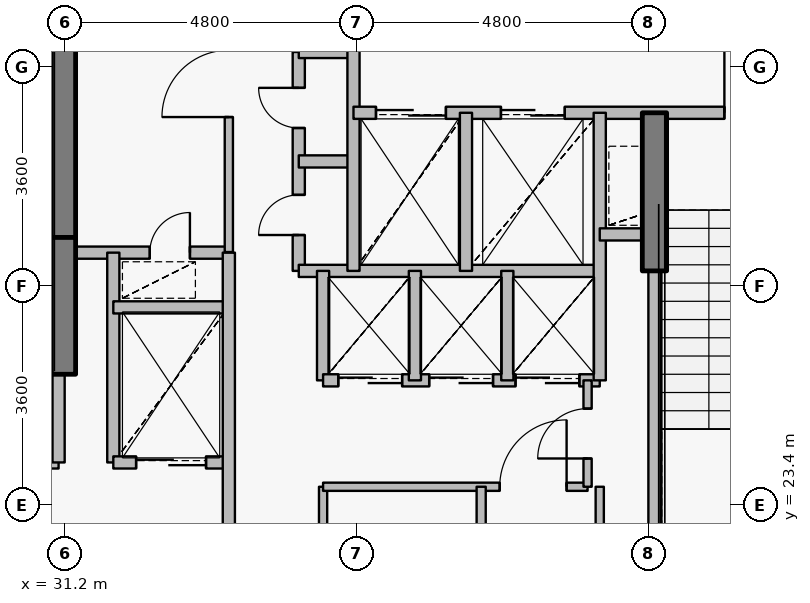
"""IFC4 building model, lengths in metres.
Left out: names, types, materials, properties, quantities, classifications, styles, units other than length and angle.
Written with IfcOpenShell. Run it as: python <this file> out.ifc"""

import sys

from ifc_helpers import new_model, si_unit, direction, frame, frame_2d, origin, origin_2d, place, context, subcontext, project, spatial, rectangle, extrude, source, transform, mapped, element, fill, save


model = new_model("IFC4")
c1 = context("Model", 3, precision=1e-05, world=origin(), true_north=direction((0.0, 1.0)))
c2 = subcontext(c1, "Body", "Model", "MODEL_VIEW")
j1 = project(units=[si_unit("LENGTHUNIT", "METRE"), si_unit("PLANEANGLEUNIT", "RADIAN")], contexts=[c1])
p1 = place(None, origin())
s1 = spatial("IfcSite", under=j1, at=p1, CompositionType="ELEMENT")
p2 = place(p1, origin())
s2 = spatial("IfcBuilding", under=s1, at=p2, CompositionType="ELEMENT")
p3 = place(p2, frame((0.0, 0.0, 331.6)))
s3 = spatial("IfcBuildingStorey", under=s2, at=p3, CompositionType="ELEMENT", Elevation=331.6)
p4 = place(p3, frame((31.18, 27.8, 0.0), z_axis=(0.0, 0.0, 1.0), x_axis=(0.0, 1.0, 0.0)))
e1 = element("IfcWall", 1, at=p4, inside=s3, PredefinedType="SHEAR", context=c2, shape_type="SweptSolid", body=[
    extrude(rectangle(XDim=4.75, YDim=0.4, at=frame_2d((2.375, 0.0))), origin(), (0.0, 0.0, 1.0), 3.8),
])
p5 = place(p3, frame((31.18, 25.55, 0.0), z_axis=(0.0, 0.0, 1.0), x_axis=(0.0, 1.0, 0.0)))
e2 = element("IfcWall", 2, at=p5, inside=s3, PredefinedType="SHEAR", context=c2, shape_type="SweptSolid", body=[
    extrude(rectangle(XDim=2.25, YDim=0.4, at=frame_2d((1.125, 0.0))), origin(), (0.0, 0.0, 1.0), 3.15),
])
p6 = place(p3, frame((40.9, 27.25, 0.0), z_axis=(0.0, 0.0, 1.0), x_axis=(0.0, 1.0, 0.0)))
e3 = element("IfcWall", 3, at=p6, inside=s3, PredefinedType="SHEAR", context=c2, shape_type="SweptSolid", body=[
    extrude(rectangle(XDim=2.6, YDim=0.4, at=frame_2d((1.3, 0.0))), origin(), (0.0, 0.0, 1.0), 3.15),
])
p7 = place(p3, frame((27.56, 24.1, 0.0), z_axis=(0.0, 0.0, 1.0), x_axis=(1.0, 0.0, 0.0)))
e4 = element("IfcWall", 4, at=p7, inside=s3, PredefinedType="PARTITIONING", context=c2, shape_type="SweptSolid", body=[
    extrude(rectangle(XDim=3.54, YDim=0.2, at=frame_2d((1.77, 0.0))), origin(), (0.0, 0.0, 1.0), 3.55),
])
p8 = place(p7, frame((1.17, 0.0, 0.0)))
e5 = element("IfcOpeningElement", 5, at=p8, cuts=e4, PredefinedType="OPENING", context=c2, shape_type="SweptSolid", body=[
    extrude(rectangle(XDim=1.2, YDim=2.15, at=origin_2d()), frame((0.6, 0.11, 1.075), z_axis=(0.0, -1.0, 0.0), x_axis=(1.0, 0.0, 0.0)), (0.0, 0.0, 1.0), 0.22),
])
p9 = place(p3, frame((31.1, 24.1, 0.0), z_axis=(0.0, 0.0, 1.0), x_axis=(0.0, 1.0, 0.0)))
e6 = element("IfcWall", 6, at=p9, inside=s3, PredefinedType="PARTITIONING", context=c2, shape_type="SweptSolid", body=[
    extrude(rectangle(XDim=1.44, YDim=0.2, at=frame_2d((0.72, 0.0))), origin(), (0.0, 0.0, 1.0), 3.55),
])
p10 = place(p3, frame((31.1, 27.55, 0.0), z_axis=(0.0, 0.0, 1.0), x_axis=(1.0, 0.0, 0.0)))
e7 = element("IfcWall", 7, at=p10, inside=s3, PredefinedType="PARTITIONING", context=c2, shape_type="SweptSolid", body=[
    extrude(rectangle(XDim=2.8, YDim=0.2, at=frame_2d((1.4, 0.0))), origin(), (0.0, 0.0, 1.0), 3.135),
])
p11 = place(p10, frame((1.5, 0.0, 0.0)))
e8 = element("IfcOpeningElement", 8, at=p11, cuts=e7, PredefinedType="OPENING", context=c2, shape_type="SweptSolid", body=[
    extrude(rectangle(XDim=0.66, YDim=2.05, at=origin_2d()), frame((0.33, 0.11, 1.025), z_axis=(0.0, -1.0, 0.0), x_axis=(1.0, 0.0, 0.0)), (0.0, 0.0, 1.0), 0.22),
])
p12 = place(p3, frame((32.0, 24.1, 0.0), z_axis=(0.0, 0.0, 1.0), x_axis=(0.0, 1.0, 0.0)))
e9 = element("IfcWall", 9, at=p12, inside=s3, PredefinedType="PARTITIONING", context=c2, shape_type="SweptSolid", body=[
    extrude(rectangle(XDim=3.45, YDim=0.2, at=frame_2d((1.725, 0.0))), origin(), (0.0, 0.0, 1.0), 3.55),
])
p13 = place(p3, frame((32.0, 24.1, 0.0), z_axis=(0.0, 0.0, 1.0), x_axis=(1.0, 0.0, 0.0)))
e10 = element("IfcWall", 10, at=p13, inside=s3, PredefinedType="PARTITIONING", context=c2, shape_type="SweptSolid", body=[
    extrude(rectangle(XDim=1.9, YDim=0.2, at=frame_2d((0.95, 0.0))), origin(), (0.0, 0.0, 1.0), 3.135),
])
p14 = place(p13, frame((0.375, 0.0, 0.0)))
e11 = element("IfcOpeningElement", 11, at=p14, cuts=e10, PredefinedType="OPENING", context=c2, shape_type="SweptSolid", body=[
    extrude(rectangle(XDim=1.15, YDim=2.15, at=origin_2d()), frame((0.575, 0.11, 1.075), z_axis=(0.0, -1.0, 0.0), x_axis=(1.0, 0.0, 0.0)), (0.0, 0.0, 1.0), 0.22),
])
p15 = place(p3, frame((32.0, 26.65, 0.0), z_axis=(0.0, 0.0, 1.0), x_axis=(1.0, 0.0, 0.0)))
e12 = element("IfcWall", 12, at=p15, inside=s3, PredefinedType="PARTITIONING", context=c2, shape_type="SweptSolid", body=[
    extrude(rectangle(XDim=1.9, YDim=0.2, at=frame_2d((0.95, 0.0))), origin(), (0.0, 0.0, 1.0), 3.135),
])
p16 = place(p3, frame((33.9, 20.9, 0.0), z_axis=(0.0, 0.0, 1.0), x_axis=(0.0, 1.0, 0.0)))
e13 = element("IfcWall", 13, at=p16, inside=s3, PredefinedType="PARTITIONING", context=c2, shape_type="SweptSolid", body=[
    extrude(rectangle(XDim=6.65, YDim=0.2, at=frame_2d((3.325, 0.0))), origin(), (0.0, 0.0, 1.0), 3.135),
])
p17 = place(p3, frame((33.9, 27.56, 0.0), z_axis=(0.0, 0.0, 1.0), x_axis=(0.0, 1.0, 0.0)))
e14 = element("IfcWall", 14, at=p17, inside=s3, PredefinedType="PARTITIONING", context=c2, shape_type="SweptSolid", body=[
    extrude(rectangle(XDim=5.54, YDim=0.135, at=frame_2d((2.77, 0.0))), origin(), (0.0, 0.0, 1.0), 3.135),
])
p18 = place(p17, frame((2.22, 0.0, 0.0)))
e15 = element("IfcOpeningElement", 15, at=p18, cuts=e14, PredefinedType="OPENING", context=c2, shape_type="SweptSolid", body=[
    extrude(rectangle(XDim=1.1, YDim=2.15, at=origin_2d()), frame((0.55, 0.078, 1.075), z_axis=(0.0, -1.0, 0.0), x_axis=(1.0, 0.0, 0.0)), (0.0, 0.0, 1.0), 0.155),
])
p19 = place(p3, frame((35.05, 27.25, 0.0), z_axis=(0.0, 0.0, 1.0), x_axis=(0.0, 1.0, 0.0)))
e16 = element("IfcWall", 16, at=p19, inside=s3, PredefinedType="PARTITIONING", context=c2, shape_type="SweptSolid", body=[
    extrude(rectangle(XDim=3.6, YDim=0.2, at=frame_2d((1.8, 0.0))), origin(), (0.0, 0.0, 1.0), 3.55),
])
p20 = place(p19, frame((0.59, 0.0, 0.0)))
e17 = element("IfcOpeningElement", 17, at=p20, cuts=e16, PredefinedType="OPENING", context=c2, shape_type="SweptSolid", body=[
    extrude(rectangle(XDim=0.66, YDim=2.05, at=origin_2d()), frame((0.33, 0.11, 1.025), z_axis=(0.0, -1.0, 0.0), x_axis=(1.0, 0.0, 0.0)), (0.0, 0.0, 1.0), 0.22),
])
p21 = place(p19, frame((2.35, 0.0, 0.0)))
e18 = element("IfcOpeningElement", 18, at=p21, cuts=e16, PredefinedType="OPENING", context=c2, shape_type="SweptSolid", body=[
    extrude(rectangle(XDim=0.66, YDim=2.05, at=origin_2d()), frame((0.33, 0.11, 1.025), z_axis=(0.0, -1.0, 0.0), x_axis=(1.0, 0.0, 0.0)), (0.0, 0.0, 1.0), 0.22),
])
p22 = place(p3, frame((35.05, 27.25, 0.0), z_axis=(0.0, 0.0, 1.0), x_axis=(1.0, 0.0, 0.0)))
e19 = element("IfcWall", 19, at=p22, inside=s3, PredefinedType="PARTITIONING", context=c2, shape_type="SweptSolid", body=[
    extrude(rectangle(XDim=4.95, YDim=0.2, at=frame_2d((2.475, 0.0))), origin(), (0.0, 0.0, 1.0), 3.135),
])
for number, where, z_axis, x_axis in (
    (20, (35.05, 29.05, 0.0), (0.0, 0.0, 1.0), (1.0, 0.0, 0.0)),
    (21, (35.05, 30.85, 0.0), (0.0, 0.0, 1.0), (1.0, 0.0, 0.0)),
):
    element("IfcWall", number, at=place(p3, frame(where, z_axis=z_axis, x_axis=x_axis)), inside=s3, PredefinedType="PARTITIONING", context=c2, shape_type="SweptSolid", body=[
        extrude(rectangle(XDim=0.9, YDim=0.2, at=frame_2d((0.45, 0.0))), origin(), (0.0, 0.0, 1.0), 3.55),
    ])
p23 = place(p3, frame((35.45, 20.9, 0.0), z_axis=(0.0, 0.0, 1.0), x_axis=(0.0, 1.0, 0.0)))
e22 = element("IfcWall", 22, at=p23, inside=s3, PredefinedType="PARTITIONING", context=c2, shape_type="SweptSolid", body=[
    extrude(rectangle(XDim=2.8, YDim=0.135, at=frame_2d((1.4, 0.0))), origin(), (0.0, 0.0, 1.0), 3.135),
])
p24 = place(p23, frame((0.85, 0.0, 0.0)))
e23 = element("IfcOpeningElement", 23, at=p24, cuts=e22, PredefinedType="OPENING", context=c2, shape_type="SweptSolid", body=[
    extrude(rectangle(XDim=1.1, YDim=2.15, at=origin_2d()), frame((0.55, 0.078, 1.075), z_axis=(0.0, -1.0, 0.0), x_axis=(1.0, 0.0, 0.0)), (0.0, 0.0, 1.0), 0.155),
])
p25 = place(p3, frame((35.45, 23.7, 0.0), z_axis=(0.0, 0.0, 1.0), x_axis=(1.0, 0.0, 0.0)))
e24 = element("IfcWall", 24, at=p25, inside=s3, PredefinedType="PARTITIONING", context=c2, shape_type="SweptSolid", body=[
    extrude(rectangle(XDim=4.35, YDim=0.135, at=frame_2d((2.175, 0.0))), origin(), (0.0, 0.0, 1.0), 3.135),
])
p26 = place(p25, frame((2.905, 0.0, 0.0)))
e25 = element("IfcOpeningElement", 25, at=p26, cuts=e24, PredefinedType="OPENING", context=c2, shape_type="SweptSolid", body=[
    extrude(rectangle(XDim=1.1, YDim=2.15, at=origin_2d()), frame((0.55, 0.078, 1.075), z_axis=(0.0, -1.0, 0.0), x_axis=(1.0, 0.0, 0.0)), (0.0, 0.0, 1.0), 0.155),
])
p27 = place(p3, frame((35.45, 25.45, 0.0), z_axis=(0.0, 0.0, 1.0), x_axis=(0.0, 1.0, 0.0)))
e26 = element("IfcWall", 26, at=p27, inside=s3, PredefinedType="PARTITIONING", context=c2, shape_type="SweptSolid", body=[
    extrude(rectangle(XDim=1.8, YDim=0.2, at=frame_2d((0.9, 0.0))), origin(), (0.0, 0.0, 1.0), 3.55),
])
p28 = place(p3, frame((35.45, 25.45, 0.0), z_axis=(0.0, 0.0, 1.0), x_axis=(1.0, 0.0, 0.0)))
e27 = element("IfcWall", 27, at=p28, inside=s3, PredefinedType="PARTITIONING", context=c2, shape_type="SweptSolid", body=[
    extrude(rectangle(XDim=4.55, YDim=0.2, at=frame_2d((2.275, 0.0))), origin(), (0.0, 0.0, 1.0), 3.135),
])
p29 = place(p28, frame((0.25, 0.0, 0.0)))
e28 = element("IfcOpeningElement", 28, at=p29, cuts=e27, PredefinedType="OPENING", context=c2, shape_type="SweptSolid", body=[
    extrude(rectangle(XDim=1.05, YDim=2.15, at=origin_2d()), frame((0.525, 0.11, 1.075), z_axis=(0.0, -1.0, 0.0), x_axis=(1.0, 0.0, 0.0)), (0.0, 0.0, 1.0), 0.22),
])
p30 = place(p28, frame((1.745, 0.0, 0.0)))
e29 = element("IfcOpeningElement", 29, at=p30, cuts=e27, PredefinedType="OPENING", context=c2, shape_type="SweptSolid", body=[
    extrude(rectangle(XDim=1.05, YDim=2.15, at=origin_2d()), frame((0.525, 0.11, 1.075), z_axis=(0.0, -1.0, 0.0), x_axis=(1.0, 0.0, 0.0)), (0.0, 0.0, 1.0), 0.22),
])
p31 = place(p28, frame((3.165, 0.0, 0.0)))
e30 = element("IfcOpeningElement", 30, at=p31, cuts=e27, PredefinedType="OPENING", context=c2, shape_type="SweptSolid", body=[
    extrude(rectangle(XDim=1.05, YDim=2.15, at=origin_2d()), frame((0.525, 0.11, 1.075), z_axis=(0.0, -1.0, 0.0), x_axis=(1.0, 0.0, 0.0)), (0.0, 0.0, 1.0), 0.22),
])
p32 = place(p3, frame((35.95, 27.25, 0.0), z_axis=(0.0, 0.0, 1.0), x_axis=(0.0, 1.0, 0.0)))
e31 = element("IfcWall", 31, at=p32, inside=s3, PredefinedType="PARTITIONING", context=c2, shape_type="SweptSolid", body=[
    extrude(rectangle(XDim=3.8, YDim=0.2, at=frame_2d((1.9, 0.0))), origin(), (0.0, 0.0, 1.0), 3.55),
])
p33 = place(p3, frame((35.95, 29.85, 0.0), z_axis=(0.0, 0.0, 1.0), x_axis=(1.0, 0.0, 0.0)))
e32 = element("IfcWall", 32, at=p33, inside=s3, PredefinedType="PARTITIONING", context=c2, shape_type="SweptSolid", body=[
    extrude(rectangle(XDim=8.49, YDim=0.2, at=frame_2d((4.245, 0.0))), origin(), (0.0, 0.0, 1.0), 3.135),
])
p34 = place(p33, frame((6.1, 0.0, 0.0)))
e33 = element("IfcOpeningElement", 33, at=p34, cuts=e32, PredefinedType="OPENING", context=c2, shape_type="SweptSolid", body=[
    extrude(rectangle(XDim=1.2, YDim=2.15, at=origin_2d()), frame((0.6, 0.11, 1.075), z_axis=(0.0, -1.0, 0.0), x_axis=(1.0, 0.0, 0.0)), (0.0, 0.0, 1.0), 0.22),
])
p35 = place(p33, frame((0.37, 0.0, 0.0)))
e34 = element("IfcOpeningElement", 34, at=p35, cuts=e32, PredefinedType="OPENING", context=c2, shape_type="SweptSolid", body=[
    extrude(rectangle(XDim=1.15, YDim=2.15, at=origin_2d()), frame((0.575, 0.11, 1.075), z_axis=(0.0, -1.0, 0.0), x_axis=(1.0, 0.0, 0.0)), (0.0, 0.0, 1.0), 0.22),
])
p36 = place(p33, frame((2.425, 0.0, 0.0)))
e35 = element("IfcOpeningElement", 35, at=p36, cuts=e32, PredefinedType="OPENING", context=c2, shape_type="SweptSolid", body=[
    extrude(rectangle(XDim=1.05, YDim=2.15, at=origin_2d()), frame((0.525, 0.11, 1.075), z_axis=(0.0, -1.0, 0.0), x_axis=(1.0, 0.0, 0.0)), (0.0, 0.0, 1.0), 0.22),
])
p37 = place(p3, frame((36.96, 25.45, 0.0), z_axis=(0.0, 0.0, 1.0), x_axis=(0.0, 1.0, 0.0)))
e36 = element("IfcWall", 36, at=p37, inside=s3, PredefinedType="PARTITIONING", context=c2, shape_type="SweptSolid", body=[
    extrude(rectangle(XDim=1.8, YDim=0.2, at=frame_2d((0.9, 0.0))), origin(), (0.0, 0.0, 1.0), 3.55),
])
p38 = place(p3, frame((37.8, 27.25, 0.0), z_axis=(0.0, 0.0, 1.0), x_axis=(0.0, 1.0, 0.0)))
e37 = element("IfcWall", 37, at=p38, inside=s3, PredefinedType="PARTITIONING", context=c2, shape_type="SweptSolid", body=[
    extrude(rectangle(XDim=2.6, YDim=0.2, at=frame_2d((1.3, 0.0))), origin(), (0.0, 0.0, 1.0), 3.55),
])
p39 = place(p3, frame((38.05, 20.38, 0.0), z_axis=(0.0, 0.0, 1.0), x_axis=(0.0, 1.0, 0.0)))
e38 = element("IfcWall", 38, at=p39, inside=s3, PredefinedType="PARTITIONING", context=c2, shape_type="SweptSolid", body=[
    extrude(rectangle(XDim=3.32, YDim=0.15, at=frame_2d((1.66, 0.0))), origin(), (0.0, 0.0, 1.0), 3.085),
])
p40 = place(p3, frame((38.48, 25.45, 0.0), z_axis=(0.0, 0.0, 1.0), x_axis=(0.0, 1.0, 0.0)))
e39 = element("IfcWall", 39, at=p40, inside=s3, PredefinedType="PARTITIONING", context=c2, shape_type="SweptSolid", body=[
    extrude(rectangle(XDim=1.8, YDim=0.2, at=frame_2d((0.9, 0.0))), origin(), (0.0, 0.0, 1.0), 3.55),
])
p41 = place(p3, frame((39.8, 23.7, 0.0), z_axis=(0.0, 0.0, 1.0), x_axis=(0.0, 1.0, 0.0)))
e40 = element("IfcWall", 40, at=p41, inside=s3, PredefinedType="PARTITIONING", context=c2, shape_type="SweptSolid", body=[
    extrude(rectangle(XDim=1.75, YDim=0.135, at=frame_2d((0.875, 0.0))), origin(), (0.0, 0.0, 1.0), 3.55),
])
p42 = place(p41, frame((0.465, 0.0, 0.0)))
e41 = element("IfcOpeningElement", 41, at=p42, cuts=e40, PredefinedType="OPENING", context=c2, shape_type="SweptSolid", body=[
    extrude(rectangle(XDim=0.82, YDim=2.1, at=origin_2d()), frame((0.41, 0.078, 1.05), z_axis=(0.0, -1.0, 0.0), x_axis=(1.0, 0.0, 0.0)), (0.0, 0.0, 1.0), 0.155),
])
p43 = place(p3, frame((40.0, 25.45, 0.0), z_axis=(0.0, 0.0, 1.0), x_axis=(0.0, 1.0, 0.0)))
e42 = element("IfcWall", 42, at=p43, inside=s3, PredefinedType="PARTITIONING", context=c2, shape_type="SweptSolid", body=[
    extrude(rectangle(XDim=4.4, YDim=0.2, at=frame_2d((2.2, 0.0))), origin(), (0.0, 0.0, 1.0), 3.55),
])
p44 = place(p3, frame((40.0, 27.85, 0.0), z_axis=(0.0, 0.0, 1.0), x_axis=(1.0, 0.0, 0.0)))
e43 = element("IfcWall", 43, at=p44, inside=s3, PredefinedType="PARTITIONING", context=c2, shape_type="SweptSolid", body=[
    extrude(rectangle(XDim=0.9, YDim=0.2, at=frame_2d((0.45, 0.0))), origin(), (0.0, 0.0, 1.0), 3.55),
])
p45 = place(p3, frame((40.9, 21.33, 0.0), z_axis=(0.0, 0.0, 1.0), x_axis=(0.0, 1.0, 0.0)))
e44 = element("IfcWall", 44, at=p45, inside=s3, PredefinedType="PARTITIONING", context=c2, shape_type="SweptSolid", body=[
    extrude(rectangle(XDim=5.91, YDim=0.2, at=frame_2d((2.955, 0.0))), origin(), (0.0, 0.0, 1.0), 3.085),
])
p46 = place(p3, frame((40.0, 23.7, 0.0), z_axis=(0.0, 0.0, 1.0), x_axis=(0.0, -1.0, 0.0)))
e45 = element("IfcWall", 45, at=p46, inside=s3, PredefinedType="PARTITIONING", context=c2, shape_type="SweptSolid", body=[
    extrude(rectangle(XDim=2.54, YDim=0.135, at=frame_2d((1.27, 0.0))), origin(), (0.0, 0.0, 1.0), 3.085),
])
m1 = source(origin(), c2, "Body", "SweptSolid", [
    extrude(rectangle(XDim=1.2, YDim=2.15, at=origin_2d()), frame((0.6, 0.025, 1.075), z_axis=(0.0, -1.0, 0.0), x_axis=(1.0, 0.0, 0.0)), (0.0, 0.0, 1.0), 0.05),
])
p47 = place(p34, origin())
e46 = element("IfcDoor", 46, at=p47, inside=s3, OperationType="SINGLE_SWING_LEFT", PredefinedType="DOOR", context=c2, shape_type="MappedRepresentation", body=[
    mapped(m1, transform((0.0, 0.0, 0.0), x_axis=(1.0, 0.0, 0.0), y_axis=(0.0, 1.0, 0.0), z_axis=(0.0, 0.0, 1.0), scale=1.0)),
])
fill(e33, e46)
m2 = source(origin(), c2, "Body", "SweptSolid", [
    extrude(rectangle(XDim=1.15, YDim=2.15, at=origin_2d()), frame((0.575, 0.025, 1.075), z_axis=(0.0, -1.0, 0.0), x_axis=(1.0, 0.0, 0.0)), (0.0, 0.0, 1.0), 0.05),
])
p48 = place(p35, origin())
e47 = element("IfcDoor", 47, at=p48, inside=s3, OperationType="DOUBLE_DOOR_SLIDING", PredefinedType="USERDEFINED", context=c2, shape_type="MappedRepresentation", body=[
    mapped(m2, transform((0.0, 0.0, 0.0), x_axis=(1.0, 0.0, 0.0), y_axis=(0.0, 1.0, 0.0), z_axis=(0.0, 0.0, 1.0), scale=1.0)),
])
fill(e34, e47)
p49 = place(p14, origin())
e48 = element("IfcDoor", 48, at=p49, inside=s3, OperationType="DOUBLE_DOOR_SLIDING", PredefinedType="USERDEFINED", context=c2, shape_type="MappedRepresentation", body=[
    mapped(m2, transform((0.0, 0.0, 0.0), x_axis=(1.0, 0.0, 0.0), y_axis=(0.0, 1.0, 0.0), z_axis=(0.0, 0.0, 1.0), scale=1.0)),
])
fill(e11, e48)
m3 = source(origin(), c2, "Body", "SweptSolid", [
    extrude(rectangle(XDim=1.05, YDim=2.15, at=origin_2d()), frame((0.525, 0.025, 1.075), z_axis=(0.0, -1.0, 0.0), x_axis=(1.0, 0.0, 0.0)), (0.0, 0.0, 1.0), 0.05),
])
p50 = place(p36, origin())
e49 = element("IfcDoor", 49, at=p50, inside=s3, OperationType="DOUBLE_DOOR_SLIDING", PredefinedType="USERDEFINED", context=c2, shape_type="MappedRepresentation", body=[
    mapped(m3, transform((0.0, 0.0, 0.0), x_axis=(1.0, 0.0, 0.0), y_axis=(0.0, 1.0, 0.0), z_axis=(0.0, 0.0, 1.0), scale=1.0)),
])
fill(e35, e49)
p51 = place(p29, origin())
e50 = element("IfcDoor", 50, at=p51, inside=s3, OperationType="DOUBLE_DOOR_SLIDING", PredefinedType="USERDEFINED", context=c2, shape_type="MappedRepresentation", body=[
    mapped(m3, transform((0.0, 0.0, 0.0), x_axis=(1.0, 0.0, 0.0), y_axis=(0.0, 1.0, 0.0), z_axis=(0.0, 0.0, 1.0), scale=1.0)),
])
fill(e28, e50)
p52 = place(p30, origin())
e51 = element("IfcDoor", 51, at=p52, inside=s3, OperationType="DOUBLE_DOOR_SLIDING", PredefinedType="USERDEFINED", context=c2, shape_type="MappedRepresentation", body=[
    mapped(m3, transform((0.0, 0.0, 0.0), x_axis=(1.0, 0.0, 0.0), y_axis=(0.0, 1.0, 0.0), z_axis=(0.0, 0.0, 1.0), scale=1.0)),
])
fill(e29, e51)
p53 = place(p31, origin())
e52 = element("IfcDoor", 52, at=p53, inside=s3, OperationType="DOUBLE_DOOR_SLIDING", PredefinedType="USERDEFINED", context=c2, shape_type="MappedRepresentation", body=[
    mapped(m3, transform((0.0, 0.0, 0.0), x_axis=(1.0, 0.0, 0.0), y_axis=(0.0, 1.0, 0.0), z_axis=(0.0, 0.0, 1.0), scale=1.0)),
])
fill(e30, e52)
m4 = source(origin(), c2, "Body", "SweptSolid", [
    extrude(rectangle(XDim=0.66, YDim=2.05, at=origin_2d()), frame((0.33, 0.025, 1.025), z_axis=(0.0, -1.0, 0.0), x_axis=(1.0, 0.0, 0.0)), (0.0, 0.0, 1.0), 0.05),
])
p54 = place(p20, origin())
e53 = element("IfcDoor", 53, at=p54, inside=s3, OperationType="SINGLE_SWING_LEFT", PredefinedType="USERDEFINED", context=c2, shape_type="MappedRepresentation", body=[
    mapped(m4, transform((0.0, 0.0, 0.0), x_axis=(1.0, 0.0, 0.0), y_axis=(0.0, 1.0, 0.0), z_axis=(0.0, 0.0, 1.0), scale=1.0)),
])
fill(e17, e53)
p55 = place(p21, origin())
e54 = element("IfcDoor", 54, at=p55, inside=s3, OperationType="SINGLE_SWING_RIGHT", PredefinedType="USERDEFINED", context=c2, shape_type="MappedRepresentation", body=[
    mapped(m4, transform((0.0, 0.0, 0.0), x_axis=(1.0, 0.0, 0.0), y_axis=(0.0, 1.0, 0.0), z_axis=(0.0, 0.0, 1.0), scale=1.0)),
])
fill(e18, e54)
m5 = source(origin(), c2, "Body", "SweptSolid", [
    extrude(rectangle(XDim=1.1, YDim=2.15, at=origin_2d()), frame((0.55, 0.025, 1.075), z_axis=(0.0, -1.0, 0.0), x_axis=(1.0, 0.0, 0.0)), (0.0, 0.0, 1.0), 0.05),
])
p56 = place(p26, origin())
e55 = element("IfcDoor", 55, at=p56, inside=s3, OperationType="SINGLE_SWING_RIGHT", PredefinedType="DOOR", context=c2, shape_type="MappedRepresentation", body=[
    mapped(m5, transform((0.0, 0.0, 0.0), x_axis=(1.0, 0.0, 0.0), y_axis=(0.0, 1.0, 0.0), z_axis=(0.0, 0.0, 1.0), scale=1.0)),
])
fill(e25, e55)
p57 = place(p18, origin())
e56 = element("IfcDoor", 56, at=p57, inside=s3, OperationType="SINGLE_SWING_LEFT", PredefinedType="DOOR", context=c2, shape_type="MappedRepresentation", body=[
    mapped(m5, transform((0.0, 0.0, 0.0), x_axis=(1.0, 0.0, 0.0), y_axis=(0.0, 1.0, 0.0), z_axis=(0.0, 0.0, 1.0), scale=1.0)),
])
fill(e15, e56)
m6 = source(origin(), c2, "Body", "SweptSolid", [
    extrude(rectangle(XDim=0.82, YDim=2.1, at=origin_2d()), frame((0.41, 0.025, 1.05), z_axis=(0.0, -1.0, 0.0), x_axis=(1.0, 0.0, 0.0)), (0.0, 0.0, 1.0), 0.05),
])
p58 = place(p42, origin())
e57 = element("IfcDoor", 57, at=p58, inside=s3, OperationType="SINGLE_SWING_LEFT", PredefinedType="DOOR", context=c2, shape_type="MappedRepresentation", body=[
    mapped(m6, transform((0.0, 0.0, 0.0), x_axis=(1.0, 0.0, 0.0), y_axis=(0.0, 1.0, 0.0), z_axis=(0.0, 0.0, 1.0), scale=1.0)),
])
fill(e41, e57)
p59 = place(p11, origin())
e58 = element("IfcDoor", 58, at=p59, inside=s3, OperationType="SINGLE_SWING_RIGHT", PredefinedType="USERDEFINED", context=c2, shape_type="MappedRepresentation", body=[
    mapped(m4, transform((0.0, 0.0, 0.0), x_axis=(1.0, 0.0, 0.0), y_axis=(0.0, 1.0, 0.0), z_axis=(0.0, 0.0, 1.0), scale=1.0)),
])
fill(e8, e58)
save(model, sys.argv[1])
